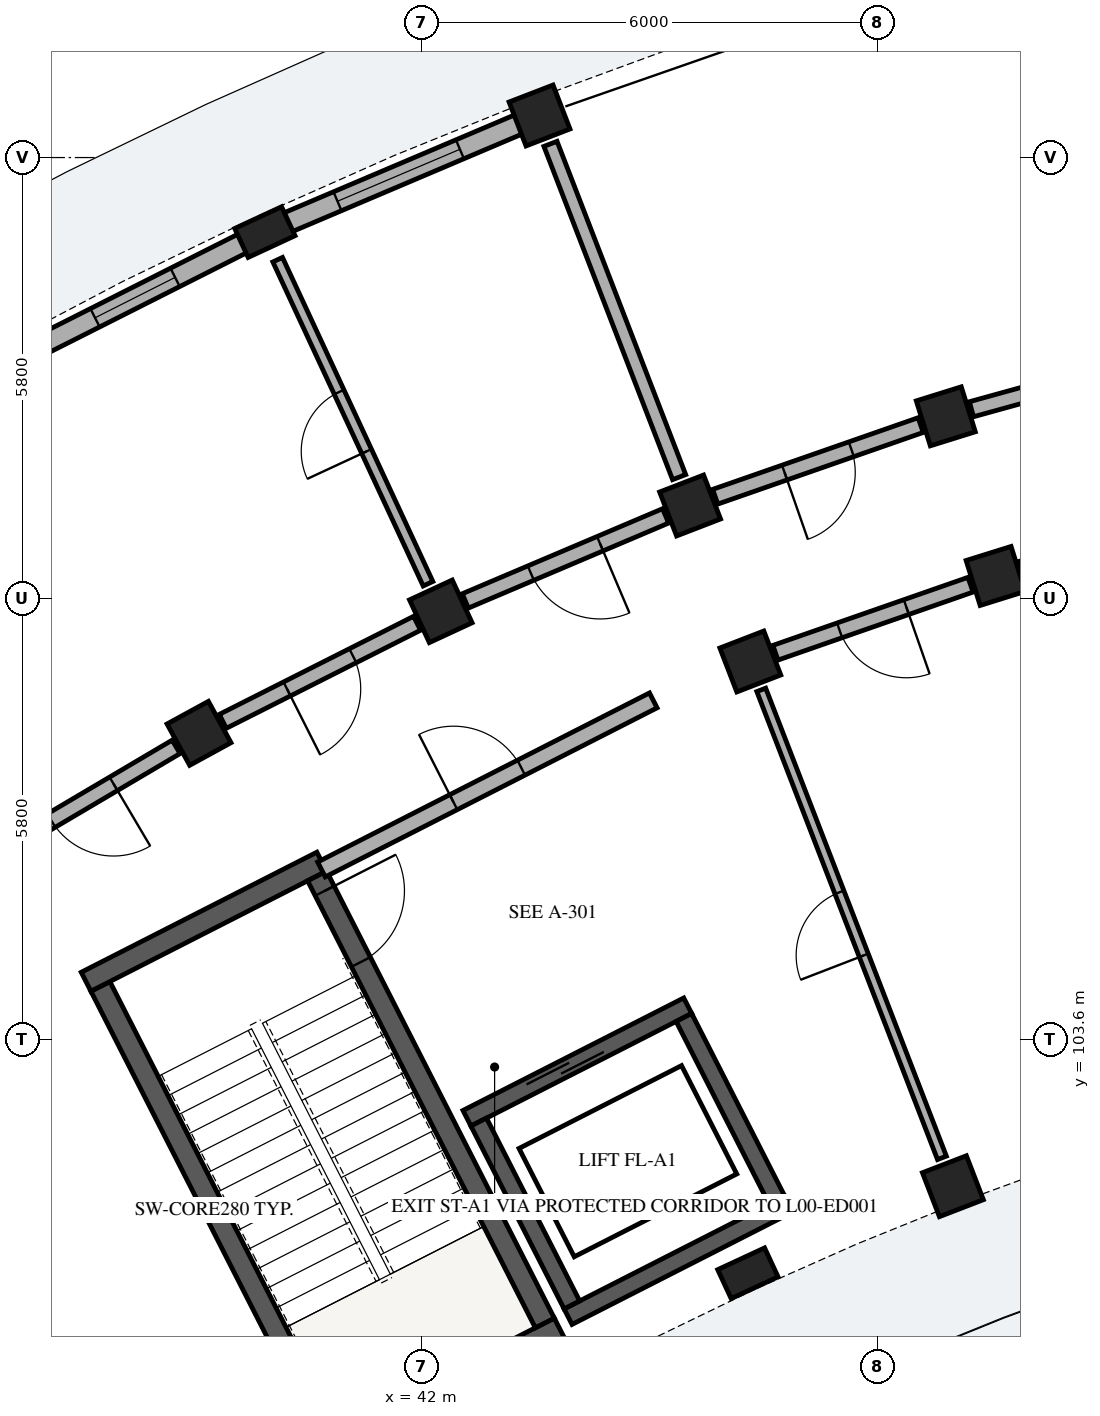
"""IFC4 building model, lengths in metres.
Left out: names, types, materials, properties, quantities, classifications, styles, units other than length and angle.
Written with IfcOpenShell. Run it as: python <this file> out.ifc"""

import sys

from ifc_helpers import new_model, si_unit, direction, frame, frame_2d, origin, origin_2d, place, context, subcontext, project, spatial, rectangle, extrude, element, fill, save


model = new_model("IFC4")
c1 = context("Model", 3, precision=1e-05, world=origin(), true_north=direction((0.0, 1.0)))
c2 = subcontext(c1, "Body", "Model", "MODEL_VIEW")
j1 = project(units=[si_unit("LENGTHUNIT", "METRE"), si_unit("PLANEANGLEUNIT", "RADIAN")], contexts=[c1])
p1 = place(None, origin())
s1 = spatial("IfcSite", under=j1, at=p1, CompositionType="ELEMENT")
p2 = place(p1, origin())
s2 = spatial("IfcBuilding", under=s1, at=p2, CompositionType="ELEMENT")
p3 = place(p2, origin())
s3 = spatial("IfcBuildingStorey", under=s2, at=p3, CompositionType="ELEMENT", Elevation=0.0)
p4 = place(p3, frame((37.773, 104.296, 0.0), z_axis=(0.0, 0.0, 1.0), x_axis=(0.453992276384, -0.891005618941, 0.0)))
e1 = element("IfcWall", 1, at=p4, inside=s3, PredefinedType="SHEAR", context=c2, shape_type="SweptSolid", body=[
    extrude(rectangle(XDim=6.6, YDim=0.28, at=frame_2d((3.3, 0.0))), origin(), (0.0, 0.0, 1.0), 4.48),
])
for number, where, z_axis, x_axis in (
    (2, (40.709, 98.227, 0.0), (0.0, 0.0, 1.0), (0.891, 0.454, 0.0)),
    (3, (37.585, 104.357, 0.0), (0.0, 0.0, 1.0), (0.891, 0.454, 0.0)),
):
    element("IfcWall", number, at=place(p3, frame(where, z_axis=z_axis, x_axis=x_axis)), inside=s3, PredefinedType="SHEAR", context=c2, shape_type="SweptSolid", body=[
        extrude(rectangle(XDim=3.48, YDim=0.28, at=frame_2d((1.74, 0.0))), origin(), (0.0, 0.0, 1.0), 4.48),
    ])
p5 = place(p3, frame((40.625, 105.748, 0.0), z_axis=(0.0, 0.0, 1.0), x_axis=(0.453992276384, -0.891005618941, 0.0)))
e4 = element("IfcWall", 4, at=p5, inside=s3, PredefinedType="SHEAR", context=c2, shape_type="SweptSolid", body=[
    extrude(rectangle(XDim=6.6, YDim=0.28, at=frame_2d((3.3, 0.0))), origin(), (0.0, 0.0, 1.0), 4.48),
])
p6 = place(p5, frame((0.22, 0.0, 0.0)))
e5 = element("IfcOpeningElement", 5, at=p6, cuts=e4, PredefinedType="OPENING", context=c2, shape_type="SweptSolid", body=[
    extrude(rectangle(XDim=1.05, YDim=2.15, at=frame_2d((0.525, 1.075))), frame((0.0, 0.15, 0.0), z_axis=(0.0, -1.0, 0.0), x_axis=(1.0, 0.0, 0.0)), (0.0, 0.0, 1.0), 0.3),
])
p7 = place(p3, frame((42.597, 102.561, 0.0), z_axis=(0.0, 0.0, 1.0), x_axis=(0.891001200497, 0.454000947921, 0.0)))
e6 = element("IfcWall", 6, at=p7, inside=s3, PredefinedType="SHEAR", context=c2, shape_type="SweptSolid", body=[
    extrude(rectangle(XDim=3.26, YDim=0.23, at=frame_2d((1.63, 0.0))), origin(), (0.0, 0.0, 1.0), 4.48),
])
p8 = place(p7, frame((0.9, 0.0, 0.0)))
e7 = element("IfcOpeningElement", 7, at=p8, cuts=e6, PredefinedType="OPENING", context=c2, shape_type="SweptSolid", body=[
    extrude(rectangle(XDim=1.1, YDim=2.15, at=frame_2d((0.55, 1.075))), frame((0.0, 0.125, 0.0), z_axis=(0.0, -1.0, 0.0), x_axis=(1.0, 0.0, 0.0)), (0.0, 0.0, 1.0), 0.25),
])
p9 = place(p3, frame((43.927, 99.95, 0.0), z_axis=(0.0, 0.0, 1.0), x_axis=(0.891016635648, 0.453970654337, 0.0)))
e8 = element("IfcWall", 8, at=p9, inside=s3, PredefinedType="SHEAR", context=c2, shape_type="SweptSolid", body=[
    extrude(rectangle(XDim=3.26, YDim=0.23, at=frame_2d((1.63, 0.0))), origin(), (0.0, 0.0, 1.0), 4.48),
])
for number, where, z_axis, x_axis in (
    (9, (42.751, 102.511, 0.0), (0.0, 0.0, 1.0), (0.454, -0.891, 0.0)),
    (10, (45.451, 103.886, 0.0), (0.0, 0.0, 1.0), (0.454, -0.891, 0.0)),
):
    element("IfcWall", number, at=place(p3, frame(where, z_axis=z_axis, x_axis=x_axis)), inside=s3, PredefinedType="SHEAR", context=c2, shape_type="SweptSolid", body=[
        extrude(rectangle(XDim=2.7, YDim=0.23, at=frame_2d((1.35, 0.0))), origin(), (0.0, 0.0, 1.0), 4.48),
    ])
for number, where, z_axis, x_axis in (
    (11, (49.552, 109.695, 0.0), (0.0, 0.0, 1.0), (-0.298, 0.955, 0.0)),
    (12, (48.897, 111.795, 0.0), (0.0, 0.0, 1.0), (-0.298, 0.955, 0.0)),
    (13, (48.99, 101.667, 0.0), (0.0, 0.0, 1.0), (-0.36, 0.933, 0.0)),
    (14, (46.325, 108.57, 0.0), (0.0, 0.0, 1.0), (-0.36, 0.933, 0.0)),
    (15, (45.532, 110.622, 0.0), (0.0, 0.0, 1.0), (-0.36, 0.933, 0.0)),
    (16, (43.552, 115.753, 0.0), (0.0, 0.0, 1.0), (-0.36, 0.933, 0.0)),
):
    element("IfcColumn", number, at=place(p3, frame(where, z_axis=z_axis, x_axis=x_axis)), inside=s3, PredefinedType="COLUMN", context=c2, shape_type="SweptSolid", body=[
        extrude(rectangle(XDim=0.62, YDim=0.62, at=origin_2d()), origin(), (0.0, 0.0, 1.0), 4.485),
    ])
p10 = place(p3, frame((46.293, 100.522, 0.0), z_axis=(0.0, 0.0, 1.0), x_axis=(-0.420859924104, 0.907125638643, 0.0)))
e17 = element("IfcColumn", 17, at=p10, inside=s3, PredefinedType="PILASTER", context=c2, shape_type="SweptSolid", body=[
    extrude(rectangle(XDim=0.42, YDim=0.68, at=origin_2d()), origin(), (0.0, 0.0, 1.0), 4.485),
])
p11 = place(p3, frame((42.252, 109.23, 0.0), z_axis=(0.0, 0.0, 1.0), x_axis=(-0.420859924104, 0.907125638643, 0.0)))
e18 = element("IfcColumn", 18, at=p11, inside=s3, PredefinedType="COLUMN", context=c2, shape_type="SweptSolid", body=[
    extrude(rectangle(XDim=0.62, YDim=0.62, at=origin_2d()), origin(), (0.0, 0.0, 1.0), 4.485),
])
p12 = place(p3, frame((39.938, 114.219, 0.0), z_axis=(0.0, 0.0, 1.0), x_axis=(-0.420859924104, 0.907125638643, 0.0)))
e19 = element("IfcColumn", 19, at=p12, inside=s3, PredefinedType="PILASTER", context=c2, shape_type="SweptSolid", body=[
    extrude(rectangle(XDim=0.42, YDim=0.68, at=origin_2d()), origin(), (0.0, 0.0, 1.0), 4.485),
])
p13 = place(p3, frame((39.072, 107.625, 0.0), z_axis=(0.0, 0.0, 1.0), x_axis=(-0.479713133669, 0.877425386791, 0.0)))
e20 = element("IfcColumn", 20, at=p13, inside=s3, PredefinedType="COLUMN", context=c2, shape_type="SweptSolid", body=[
    extrude(rectangle(XDim=0.62, YDim=0.62, at=origin_2d()), origin(), (0.0, 0.0, 1.0), 4.485),
])
p14 = place(p3, frame((43.294, 115.644, 0.0), z_axis=(0.0, 0.0, 1.0), x_axis=(-0.920495033259, -0.390754262607, 0.0)))
e21 = element("IfcWall", 21, at=p14, inside=s3, PredefinedType="SOLIDWALL", context=c2, shape_type="SweptSolid", body=[
    extrude(rectangle(XDim=3.466, YDim=0.27, at=frame_2d((1.733, 0.0))), origin(), (0.0, 0.0, 1.0), 3.755),
])
p15 = place(p14, frame((0.858, 0.0, 0.55)))
e22 = element("IfcOpeningElement", 22, at=p15, cuts=e21, PredefinedType="OPENING", context=c2, shape_type="SweptSolid", body=[
    extrude(rectangle(XDim=1.75, YDim=1.85, at=frame_2d((0.875, 0.925))), frame((0.0, 0.145, 0.0), z_axis=(0.0, -1.0, 0.0), x_axis=(1.0, 0.0, 0.0)), (0.0, 0.0, 1.0), 0.29),
])
p16 = place(p3, frame((39.777, 114.138, 0.0), z_axis=(0.0, 0.0, 1.0), x_axis=(-0.892772658884, -0.450507468915, 0.0)))
e23 = element("IfcWall", 23, at=p16, inside=s3, PredefinedType="SOLIDWALL", context=c2, shape_type="SweptSolid", body=[
    extrude(rectangle(XDim=3.466, YDim=0.27, at=frame_2d((1.733, 0.0))), origin(), (0.0, 0.0, 1.0), 3.755),
])
p17 = place(p16, frame((1.143, 0.0, 0.55)))
e24 = element("IfcOpeningElement", 24, at=p17, cuts=e23, PredefinedType="OPENING", context=c2, shape_type="SweptSolid", body=[
    extrude(rectangle(XDim=1.18, YDim=1.48, at=frame_2d((0.59, 0.74))), frame((0.0, 0.145, 0.0), z_axis=(0.0, -1.0, 0.0), x_axis=(1.0, 0.0, 0.0)), (0.0, 0.0, 1.0), 0.29),
])
p18 = place(p3, frame((40.682, 105.834, 0.0), z_axis=(0.0, 0.0, 1.0), x_axis=(0.891003372311, 0.453996685595, 0.0)))
e25 = element("IfcWall", 25, at=p18, inside=s3, PredefinedType="PARTITIONING", context=c2, shape_type="SweptSolid", body=[
    extrude(rectangle(XDim=4.9, YDim=0.22, at=frame_2d((2.45, 0.0))), origin(), (0.0, 0.0, 1.0), 3.74),
])
p19 = place(p18, frame((1.95, 0.0, 0.0)))
e26 = element("IfcOpeningElement", 26, at=p19, cuts=e25, PredefinedType="OPENING", context=c2, shape_type="SweptSolid", body=[
    extrude(rectangle(XDim=1.0, YDim=2.15, at=frame_2d((0.5, 1.075))), frame((0.0, 0.12, 0.0), z_axis=(0.0, -1.0, 0.0), x_axis=(1.0, 0.0, 0.0)), (0.0, 0.0, 1.0), 0.24),
])
p20 = place(p3, frame((51.994, 112.651, 0.0), z_axis=(0.0, 0.0, 1.0), x_axis=(-0.963890789093, -0.266297853356, 0.0)))
e27 = element("IfcWall", 27, at=p20, inside=s3, PredefinedType="PARTITIONING", context=c2, shape_type="SweptSolid", body=[
    extrude(rectangle(XDim=2.863, YDim=0.205, at=frame_2d((1.432, 0.0))), origin(), (0.0, 0.0, 1.0), 3.1),
])
p21 = place(p20, frame((0.957, 0.0, 0.0)))
e28 = element("IfcOpeningElement", 28, at=p21, cuts=e27, PredefinedType="OPENING", context=c2, shape_type="SweptSolid", body=[
    extrude(rectangle(XDim=0.95, YDim=2.13, at=frame_2d((0.475, 1.065))), frame((0.0, 0.113, 0.0), z_axis=(0.0, -1.0, 0.0), x_axis=(1.0, 0.0, 0.0)), (0.0, 0.0, 1.0), 0.225),
])
p22 = place(p3, frame((52.51, 110.512, 0.0), z_axis=(0.0, 0.0, 1.0), x_axis=(-0.96388375821, -0.266323301006, 0.0)))
e29 = element("IfcWall", 29, at=p22, inside=s3, PredefinedType="PARTITIONING", context=c2, shape_type="SweptSolid", body=[
    extrude(rectangle(XDim=2.718, YDim=0.205, at=frame_2d((1.359, 0.0))), origin(), (0.0, 0.0, 1.0), 3.1),
])
p23 = place(p22, frame((0.884, 0.0, 0.0)))
e30 = element("IfcOpeningElement", 30, at=p23, cuts=e29, PredefinedType="OPENING", context=c2, shape_type="SweptSolid", body=[
    extrude(rectangle(XDim=0.95, YDim=2.13, at=frame_2d((0.475, 1.065))), frame((0.0, 0.113, 0.0), z_axis=(0.0, -1.0, 0.0), x_axis=(1.0, 0.0, 0.0)), (0.0, 0.0, 1.0), 0.225),
])
p24 = place(p3, frame((48.566, 111.68, 0.0), z_axis=(0.0, 0.0, 1.0), x_axis=(-0.944253820929, -0.329218349522, 0.0)))
e31 = element("IfcWall", 31, at=p24, inside=s3, PredefinedType="PARTITIONING", context=c2, shape_type="SweptSolid", body=[
    extrude(rectangle(XDim=2.863, YDim=0.205, at=frame_2d((1.432, 0.0))), origin(), (0.0, 0.0, 1.0), 3.1),
])
p25 = place(p24, frame((0.967, 0.0, 0.0)))
e32 = element("IfcOpeningElement", 32, at=p25, cuts=e31, PredefinedType="OPENING", context=c2, shape_type="SweptSolid", body=[
    extrude(rectangle(XDim=0.93, YDim=2.12, at=frame_2d((0.465, 1.06))), frame((0.0, 0.113, 0.0), z_axis=(0.0, -1.0, 0.0), x_axis=(1.0, 0.0, 0.0)), (0.0, 0.0, 1.0), 0.225),
])
p26 = place(p3, frame((49.222, 109.58, 0.0), z_axis=(0.0, 0.0, 1.0), x_axis=(-0.944265123647, -0.329185929627, 0.0)))
e33 = element("IfcWall", 33, at=p26, inside=s3, PredefinedType="PARTITIONING", context=c2, shape_type="SweptSolid", body=[
    extrude(rectangle(XDim=2.718, YDim=0.205, at=frame_2d((1.359, 0.0))), origin(), (0.0, 0.0, 1.0), 3.1),
])
p27 = place(p26, frame((0.894, 0.0, 0.0)))
e34 = element("IfcOpeningElement", 34, at=p27, cuts=e33, PredefinedType="OPENING", context=c2, shape_type="SweptSolid", body=[
    extrude(rectangle(XDim=0.93, YDim=2.12, at=frame_2d((0.465, 1.06))), frame((0.0, 0.113, 0.0), z_axis=(0.0, -1.0, 0.0), x_axis=(1.0, 0.0, 0.0)), (0.0, 0.0, 1.0), 0.225),
])
p28 = place(p3, frame((45.388, 110.996, 0.0), z_axis=(0.0, 0.0, 1.0), x_axis=(-0.360186633854, 0.932880264982, 0.0)))
e35 = element("IfcWall", 35, at=p28, inside=s3, PredefinedType="PARTITIONING", context=c2, shape_type="SweptSolid", body=[
    extrude(rectangle(XDim=4.7, YDim=0.185, at=frame_2d((2.35, 0.0))), origin(), (0.0, 0.0, 1.0), 3.1),
])
p29 = place(p3, frame((48.846, 102.04, 0.0), z_axis=(0.0, 0.0, 1.0), x_axis=(-0.360183473608, 0.932881485152, 0.0)))
e36 = element("IfcWall", 36, at=p29, inside=s3, PredefinedType="PARTITIONING", context=c2, shape_type="SweptSolid", body=[
    extrude(rectangle(XDim=6.6, YDim=0.125, at=frame_2d((3.3, 0.0))), origin(), (0.0, 0.0, 1.0), 3.1),
])
p30 = place(p29, frame((2.855, 0.0, 0.0)))
e37 = element("IfcOpeningElement", 37, at=p30, cuts=e36, PredefinedType="OPENING", context=c2, shape_type="SweptSolid", body=[
    extrude(rectangle(XDim=0.89, YDim=2.1, at=frame_2d((0.445, 1.05))), frame((0.0, 0.073, 0.0), z_axis=(0.0, -1.0, 0.0), x_axis=(1.0, 0.0, 0.0)), (0.0, 0.0, 1.0), 0.145),
])
p31 = place(p3, frame((45.21, 110.486, 0.0), z_axis=(0.0, 0.0, 1.0), x_axis=(-0.920511160294, -0.390716270168, 0.0)))
e38 = element("IfcWall", 38, at=p31, inside=s3, PredefinedType="PARTITIONING", context=c2, shape_type="SweptSolid", body=[
    extrude(rectangle(XDim=2.863, YDim=0.205, at=frame_2d((1.432, 0.0))), origin(), (0.0, 0.0, 1.0), 3.1),
])
p32 = place(p31, frame((0.937, 0.0, 0.0)))
e39 = element("IfcOpeningElement", 39, at=p32, cuts=e38, PredefinedType="OPENING", context=c2, shape_type="SweptSolid", body=[
    extrude(rectangle(XDim=0.99, YDim=2.16, at=frame_2d((0.495, 1.08))), frame((0.0, 0.113, 0.0), z_axis=(0.0, -1.0, 0.0), x_axis=(1.0, 0.0, 0.0)), (0.0, 0.0, 1.0), 0.225),
])
p33 = place(p3, frame((42.084, 109.593, 0.0), z_axis=(0.0, 0.0, 1.0), x_axis=(-0.420862519045, 0.907124434718, 0.0)))
e40 = element("IfcWall", 40, at=p33, inside=s3, PredefinedType="PLUMBINGWALL", context=c2, shape_type="SweptSolid", body=[
    extrude(rectangle(XDim=4.7, YDim=0.14, at=frame_2d((2.35, 0.0))), origin(), (0.0, 0.0, 1.0), 3.1),
])
p34 = place(p33, frame((1.92, 0.0, 0.0)))
e41 = element("IfcOpeningElement", 41, at=p34, cuts=e40, PredefinedType="OPENING", context=c2, shape_type="SweptSolid", body=[
    extrude(rectangle(XDim=0.86, YDim=2.06, at=frame_2d((0.43, 1.03))), frame((0.0, 0.08, 0.0), z_axis=(0.0, -1.0, 0.0), x_axis=(1.0, 0.0, 0.0)), (0.0, 0.0, 1.0), 0.16),
])
p35 = place(p3, frame((41.94, 109.073, 0.0), z_axis=(0.0, 0.0, 1.0), x_axis=(-0.89273239336, -0.450587254419, 0.0)))
e42 = element("IfcWall", 42, at=p35, inside=s3, PredefinedType="PARTITIONING", context=c2, shape_type="SweptSolid", body=[
    extrude(rectangle(XDim=2.863, YDim=0.205, at=frame_2d((1.432, 0.0))), origin(), (0.0, 0.0, 1.0), 3.1),
])
p36 = place(p35, frame((0.947, 0.0, 0.0)))
e43 = element("IfcOpeningElement", 43, at=p36, cuts=e42, PredefinedType="OPENING", context=c2, shape_type="SweptSolid", body=[
    extrude(rectangle(XDim=0.97, YDim=2.15, at=frame_2d((0.485, 1.075))), frame((0.0, 0.113, 0.0), z_axis=(0.0, -1.0, 0.0), x_axis=(1.0, 0.0, 0.0)), (0.0, 0.0, 1.0), 0.225),
])
p37 = place(p3, frame((38.77, 107.447, 0.0), z_axis=(0.0, 0.0, 1.0), x_axis=(-0.861113214678, -0.508413248753, 0.0)))
e44 = element("IfcWall", 44, at=p37, inside=s3, PredefinedType="PARTITIONING", context=c2, shape_type="SweptSolid", body=[
    extrude(rectangle(XDim=2.863, YDim=0.205, at=frame_2d((1.432, 0.0))), origin(), (0.0, 0.0, 1.0), 3.1),
])
p38 = place(p37, frame((0.957, 0.0, 0.0)))
e45 = element("IfcOpeningElement", 45, at=p38, cuts=e44, PredefinedType="OPENING", context=c2, shape_type="SweptSolid", body=[
    extrude(rectangle(XDim=0.95, YDim=2.13, at=frame_2d((0.475, 1.065))), frame((0.0, 0.113, 0.0), z_axis=(0.0, -1.0, 0.0), x_axis=(1.0, 0.0, 0.0)), (0.0, 0.0, 1.0), 0.225),
])
p39 = place(p3, frame((38.497, 96.382, 0.0), z_axis=(0.0, 0.0, 1.0), x_axis=(-0.590924179316, 0.806727100263, 0.0)))
e46 = element("IfcWall", 46, at=p39, inside=s3, PredefinedType="PARTITIONING", context=c2, shape_type="SweptSolid", body=[
    extrude(rectangle(XDim=6.6, YDim=0.125, at=frame_2d((3.3, 0.0))), origin(), (0.0, 0.0, 1.0), 3.1),
])
p40 = place(p39, frame((2.865, 0.0, 0.0)))
e47 = element("IfcOpeningElement", 47, at=p40, cuts=e46, PredefinedType="OPENING", context=c2, shape_type="SweptSolid", body=[
    extrude(rectangle(XDim=0.87, YDim=2.08, at=frame_2d((0.435, 1.04))), frame((0.0, 0.073, 0.0), z_axis=(0.0, -1.0, 0.0), x_axis=(1.0, 0.0, 0.0)), (0.0, 0.0, 1.0), 0.145),
])
p41 = place(p15, origin())
e48 = element("IfcWindow", 48, at=p41, inside=s3, PartitioningType="SINGLE_PANEL", PredefinedType="WINDOW", context=c2, shape_type="SweptSolid", body=[
    extrude(rectangle(XDim=1.75, YDim=1.85, at=frame_2d((0.875, 0.925))), frame((0.0, 0.03, 0.0), z_axis=(0.0, -1.0, 0.0), x_axis=(1.0, 0.0, 0.0)), (0.0, 0.0, 1.0), 0.06),
])
fill(e22, e48)
p42 = place(p17, origin())
e49 = element("IfcWindow", 49, at=p42, inside=s3, PartitioningType="SINGLE_PANEL", PredefinedType="WINDOW", context=c2, shape_type="SweptSolid", body=[
    extrude(rectangle(XDim=1.18, YDim=1.48, at=frame_2d((0.59, 0.74))), frame((0.0, 0.03, 0.0), z_axis=(0.0, -1.0, 0.0), x_axis=(1.0, 0.0, 0.0)), (0.0, 0.0, 1.0), 0.06),
])
fill(e24, e49)
p43 = place(p6, origin())
e50 = element("IfcDoor", 50, at=p43, inside=s3, OperationType="SINGLE_SWING_LEFT", PredefinedType="DOOR", context=c2, shape_type="SweptSolid", body=[
    extrude(rectangle(XDim=1.05, YDim=2.15, at=frame_2d((0.525, 1.075))), frame((0.0, 0.025, 0.0), z_axis=(0.0, -1.0, 0.0), x_axis=(1.0, 0.0, 0.0)), (0.0, 0.0, 1.0), 0.05),
])
fill(e5, e50)
p44 = place(p8, origin())
e51 = element("IfcDoor", 51, at=p44, inside=s3, OperationType="DOUBLE_DOOR_SLIDING", PredefinedType="DOOR", context=c2, shape_type="SweptSolid", body=[
    extrude(rectangle(XDim=1.1, YDim=2.15, at=frame_2d((0.55, 1.075))), frame((0.0, 0.025, 0.0), z_axis=(0.0, -1.0, 0.0), x_axis=(1.0, 0.0, 0.0)), (0.0, 0.0, 1.0), 0.05),
])
fill(e7, e51)
p45 = place(p19, origin())
e52 = element("IfcDoor", 52, at=p45, inside=s3, OperationType="SINGLE_SWING_LEFT", PredefinedType="DOOR", context=c2, shape_type="SweptSolid", body=[
    extrude(rectangle(XDim=1.0, YDim=2.15, at=frame_2d((0.5, 1.075))), frame((0.0, 0.025, 0.0), z_axis=(0.0, -1.0, 0.0), x_axis=(1.0, 0.0, 0.0)), (0.0, 0.0, 1.0), 0.05),
])
fill(e26, e52)
p46 = place(p25, origin())
e53 = element("IfcDoor", 53, at=p46, inside=s3, OperationType="SINGLE_SWING_RIGHT", PredefinedType="DOOR", context=c2, shape_type="SweptSolid", body=[
    extrude(rectangle(XDim=0.93, YDim=2.12, at=frame_2d((0.465, 1.06))), frame((0.0, 0.025, 0.0), z_axis=(0.0, -1.0, 0.0), x_axis=(1.0, 0.0, 0.0)), (0.0, 0.0, 1.0), 0.05),
])
fill(e32, e53)
p47 = place(p27, origin())
e54 = element("IfcDoor", 54, at=p47, inside=s3, OperationType="SINGLE_SWING_LEFT", PredefinedType="DOOR", context=c2, shape_type="SweptSolid", body=[
    extrude(rectangle(XDim=0.93, YDim=2.12, at=frame_2d((0.465, 1.06))), frame((0.0, 0.025, 0.0), z_axis=(0.0, -1.0, 0.0), x_axis=(1.0, 0.0, 0.0)), (0.0, 0.0, 1.0), 0.05),
])
fill(e34, e54)
p48 = place(p30, origin())
e55 = element("IfcDoor", 55, at=p48, inside=s3, OperationType="SINGLE_SWING_LEFT", PredefinedType="DOOR", context=c2, shape_type="SweptSolid", body=[
    extrude(rectangle(XDim=0.89, YDim=2.1, at=frame_2d((0.445, 1.05))), frame((0.0, 0.025, 0.0), z_axis=(0.0, -1.0, 0.0), x_axis=(1.0, 0.0, 0.0)), (0.0, 0.0, 1.0), 0.05),
])
fill(e37, e55)
p49 = place(p32, origin())
e56 = element("IfcDoor", 56, at=p49, inside=s3, OperationType="SINGLE_SWING_LEFT", PredefinedType="DOOR", context=c2, shape_type="SweptSolid", body=[
    extrude(rectangle(XDim=0.99, YDim=2.16, at=frame_2d((0.495, 1.08))), frame((0.0, 0.025, 0.0), z_axis=(0.0, -1.0, 0.0), x_axis=(1.0, 0.0, 0.0)), (0.0, 0.0, 1.0), 0.05),
])
fill(e39, e56)
p50 = place(p34, origin())
e57 = element("IfcDoor", 57, at=p50, inside=s3, OperationType="SINGLE_SWING_LEFT", PredefinedType="DOOR", context=c2, shape_type="SweptSolid", body=[
    extrude(rectangle(XDim=0.86, YDim=2.06, at=frame_2d((0.43, 1.03))), frame((0.0, 0.025, 0.0), z_axis=(0.0, -1.0, 0.0), x_axis=(1.0, 0.0, 0.0)), (0.0, 0.0, 1.0), 0.05),
])
fill(e41, e57)
p51 = place(p36, origin())
e58 = element("IfcDoor", 58, at=p51, inside=s3, OperationType="SINGLE_SWING_RIGHT", PredefinedType="DOOR", context=c2, shape_type="SweptSolid", body=[
    extrude(rectangle(XDim=0.97, YDim=2.15, at=frame_2d((0.485, 1.075))), frame((0.0, 0.025, 0.0), z_axis=(0.0, -1.0, 0.0), x_axis=(1.0, 0.0, 0.0)), (0.0, 0.0, 1.0), 0.05),
])
fill(e43, e58)
p52 = place(p38, origin())
e59 = element("IfcDoor", 59, at=p52, inside=s3, OperationType="SINGLE_SWING_LEFT", PredefinedType="DOOR", context=c2, shape_type="SweptSolid", body=[
    extrude(rectangle(XDim=0.95, YDim=2.13, at=frame_2d((0.475, 1.065))), frame((0.0, 0.025, 0.0), z_axis=(0.0, -1.0, 0.0), x_axis=(1.0, 0.0, 0.0)), (0.0, 0.0, 1.0), 0.05),
])
fill(e45, e59)
save(model, sys.argv[1])
